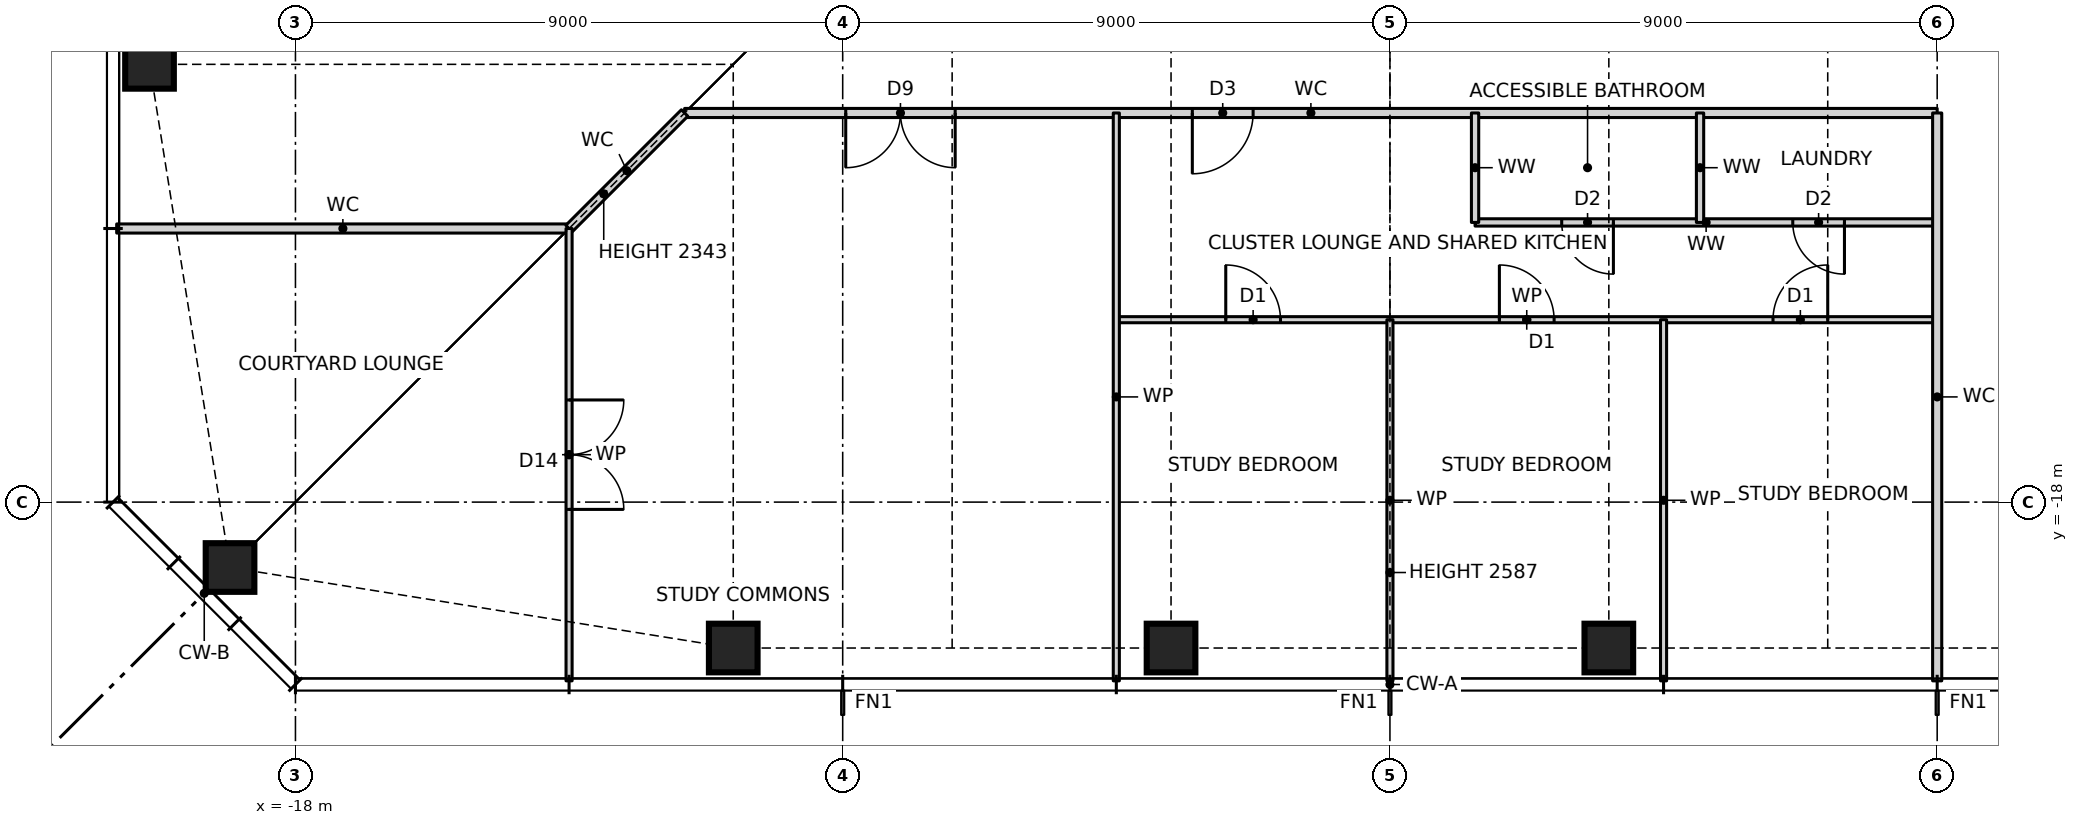
"""IFC4 building model, lengths in metres.
Left out: names, types, materials, properties, quantities, classifications, styles, units other than length and angle.
Written with IfcOpenShell. Run it as: python <this file> out.ifc"""

import sys

from ifc_helpers import new_model, si_unit, direction, frame, frame_2d, origin, origin_2d, place, context, subcontext, project, spatial, rectangle, hollow_rectangle, extrude, element, fill, save


model = new_model("IFC4")
c1 = context("Model", 3, precision=1e-05, world=origin(), true_north=direction((0.0, 1.0)))
c2 = subcontext(c1, "Body", "Model", "MODEL_VIEW")
j1 = project(units=[si_unit("LENGTHUNIT", "METRE"), si_unit("PLANEANGLEUNIT", "RADIAN")], contexts=[c1])
p1 = place(None, origin())
s1 = spatial("IfcSite", under=j1, at=p1, CompositionType="ELEMENT")
p2 = place(p1, origin())
s2 = spatial("IfcBuilding", under=s1, at=p2, CompositionType="ELEMENT")
p3 = place(p2, frame((0.0, 0.0, 108.5)))
s3 = spatial("IfcBuildingStorey", under=s2, at=p3, CompositionType="ELEMENT", Elevation=108.5)
for number, where, z_axis, x_axis in (
    (1, (-19.076, -19.076, 0.0), (0.0, 0.0, 1.0), (1.0, 0.0, 0.0)),
    (2, (-10.8, -20.4, 0.0), (0.0, 0.0, 1.0), (1.0, 0.0, 0.0)),
    (3, (-3.6, -20.4, 0.0), (0.0, 0.0, 1.0), (1.0, 0.0, 0.0)),
    (4, (3.6, -20.4, 0.0), (0.0, 0.0, 1.0), (1.0, 0.0, 0.0)),
    (5, (-20.4, -10.8, 0.0), (0.0, 0.0, 1.0), (1.0, 0.0, 0.0)),
):
    element("IfcColumn", number, at=place(p3, frame(where, z_axis=z_axis, x_axis=x_axis)), inside=s3, PredefinedType="COLUMN", context=c2, shape_type="SweptSolid", body=[
        extrude(hollow_rectangle(XDim=0.8, YDim=0.8, WallThickness=0.07, at=origin_2d()), origin(), (0.0, 0.0, 1.0), 3.5),
    ])
p4 = place(p3, frame((-4.5, -15.0, 0.0), z_axis=(0.0, 0.0, 1.0), x_axis=(1.0, 0.0, 0.0)))
e6 = element("IfcWall", 6, at=p4, inside=s3, PredefinedType="PARTITIONING", context=c2, shape_type="SweptSolid", body=[
    extrude(rectangle(XDim=13.5, YDim=0.1, at=frame_2d((6.75, 0.0))), origin(), (0.0, 0.0, 1.0), 3.27),
])
p5 = place(p4, frame((1.8, 0.0, 0.0)))
e7 = element("IfcOpeningElement", 7, at=p5, cuts=e6, PredefinedType="OPENING", context=c2, shape_type="SweptSolid", body=[
    extrude(rectangle(XDim=0.9, YDim=2.1, at=frame_2d((0.45, 1.05))), frame((0.0, 0.06, 0.0), z_axis=(0.0, -1.0, 0.0), x_axis=(1.0, 0.0, 0.0)), (0.0, 0.0, 1.0), 0.12),
])
p6 = place(p4, frame((6.3, 0.0, 0.0)))
e8 = element("IfcOpeningElement", 8, at=p6, cuts=e6, PredefinedType="OPENING", context=c2, shape_type="SweptSolid", body=[
    extrude(rectangle(XDim=0.9, YDim=2.1, at=frame_2d((0.45, 1.05))), frame((0.0, 0.06, 0.0), z_axis=(0.0, -1.0, 0.0), x_axis=(1.0, 0.0, 0.0)), (0.0, 0.0, 1.0), 0.12),
])
p7 = place(p4, frame((10.8, 0.0, 0.0)))
e9 = element("IfcOpeningElement", 9, at=p7, cuts=e6, PredefinedType="OPENING", context=c2, shape_type="SweptSolid", body=[
    extrude(rectangle(XDim=0.9, YDim=2.1, at=frame_2d((0.45, 1.05))), frame((0.0, 0.06, 0.0), z_axis=(0.0, -1.0, 0.0), x_axis=(1.0, 0.0, 0.0)), (0.0, 0.0, 1.0), 0.12),
])
p8 = place(p3, frame((-20.94, -13.5, 0.0), z_axis=(0.0, 0.0, 1.0), x_axis=(1.0, 0.0, 0.0)))
e10 = element("IfcWall", 10, at=p8, inside=s3, PredefinedType="PARTITIONING", context=c2, shape_type="SweptSolid", body=[
    extrude(rectangle(XDim=7.44, YDim=0.15, at=frame_2d((3.72, 0.0))), origin(), (0.0, 0.0, 1.0), 3.27),
])
p9 = place(p3, frame((1.4, -13.4, 0.0), z_axis=(0.0, 0.0, 1.0), x_axis=(1.0, 0.0, 0.0)))
e11 = element("IfcWall", 11, at=p9, inside=s3, PredefinedType="PARTITIONING", context=c2, shape_type="SweptSolid", body=[
    extrude(rectangle(XDim=7.6, YDim=0.12, at=frame_2d((3.8, 0.0))), origin(), (0.0, 0.0, 1.0), 3.27),
])
p10 = place(p9, frame((1.425, 0.0, 0.0)))
e12 = element("IfcOpeningElement", 12, at=p10, cuts=e11, PredefinedType="OPENING", context=c2, shape_type="SweptSolid", body=[
    extrude(rectangle(XDim=0.85, YDim=2.1, at=frame_2d((0.425, 1.05))), frame((0.0, 0.07, 0.0), z_axis=(0.0, -1.0, 0.0), x_axis=(1.0, 0.0, 0.0)), (0.0, 0.0, 1.0), 0.14),
])
p11 = place(p9, frame((5.225, 0.0, 0.0)))
e13 = element("IfcOpeningElement", 13, at=p11, cuts=e11, PredefinedType="OPENING", context=c2, shape_type="SweptSolid", body=[
    extrude(rectangle(XDim=0.85, YDim=2.1, at=frame_2d((0.425, 1.05))), frame((0.0, 0.07, 0.0), z_axis=(0.0, -1.0, 0.0), x_axis=(1.0, 0.0, 0.0)), (0.0, 0.0, 1.0), 0.14),
])
p12 = place(p3, frame((-11.6, -11.6, 0.0), z_axis=(0.0, 0.0, 1.0), x_axis=(1.0, 0.0, 0.0)))
e14 = element("IfcWall", 14, at=p12, inside=s3, PredefinedType="PARTITIONING", context=c2, shape_type="SweptSolid", body=[
    extrude(rectangle(XDim=20.6, YDim=0.15, at=frame_2d((10.3, 0.0))), origin(), (0.0, 0.0, 1.0), 3.27),
])
p13 = place(p12, frame((2.65, 0.0, 0.0)))
e15 = element("IfcOpeningElement", 15, at=p13, cuts=e14, PredefinedType="OPENING", context=c2, shape_type="SweptSolid", body=[
    extrude(rectangle(XDim=1.8, YDim=2.1, at=frame_2d((0.9, 1.05))), frame((0.0, 0.085, 0.0), z_axis=(0.0, -1.0, 0.0), x_axis=(1.0, 0.0, 0.0)), (0.0, 0.0, 1.0), 0.17),
])
p14 = place(p12, frame((8.35, 0.0, 0.0)))
e16 = element("IfcOpeningElement", 16, at=p14, cuts=e14, PredefinedType="OPENING", context=c2, shape_type="SweptSolid", body=[
    extrude(rectangle(XDim=1.0, YDim=2.1, at=frame_2d((0.5, 1.05))), frame((0.0, 0.085, 0.0), z_axis=(0.0, -1.0, 0.0), x_axis=(1.0, 0.0, 0.0)), (0.0, 0.0, 1.0), 0.17),
])
p15 = place(p3, frame((-13.5, -13.5, 0.0), z_axis=(0.0, 0.0, 1.0), x_axis=(0.707106781187, 0.707106781187, 0.0)))
e17 = element("IfcWall", 17, at=p15, inside=s3, PredefinedType="PARTITIONING", context=c2, shape_type="SweptSolid", body=[
    extrude(rectangle(XDim=2.687, YDim=0.15, at=frame_2d((1.343, 0.0))), origin(), (0.0, 0.0, 1.0), 2.343),
])
p16 = place(p3, frame((9.0, -20.94, 0.0), z_axis=(0.0, 0.0, 1.0), x_axis=(0.0, 1.0, 0.0)))
e18 = element("IfcWall", 18, at=p16, inside=s3, PredefinedType="PARTITIONING", context=c2, shape_type="SweptSolid", body=[
    extrude(rectangle(XDim=9.34, YDim=0.15, at=frame_2d((4.67, 0.0))), origin(), (0.0, 0.0, 1.0), 3.27),
])
p17 = place(p3, frame((5.1, -13.4, 0.0), z_axis=(0.0, 0.0, 1.0), x_axis=(0.0, 1.0, 0.0)))
e19 = element("IfcWall", 19, at=p17, inside=s3, PredefinedType="PARTITIONING", context=c2, shape_type="SweptSolid", body=[
    extrude(rectangle(XDim=1.8, YDim=0.12, at=frame_2d((0.9, 0.0))), origin(), (0.0, 0.0, 1.0), 3.27),
])
p18 = place(p3, frame((4.5, -20.94, 0.0), z_axis=(0.0, 0.0, 1.0), x_axis=(0.0, 1.0, 0.0)))
e20 = element("IfcWall", 20, at=p18, inside=s3, PredefinedType="PARTITIONING", context=c2, shape_type="SweptSolid", body=[
    extrude(rectangle(XDim=5.94, YDim=0.1, at=frame_2d((2.97, 0.0))), origin(), (0.0, 0.0, 1.0), 3.27),
])
p19 = place(p3, frame((1.4, -13.4, 0.0), z_axis=(0.0, 0.0, 1.0), x_axis=(0.0, 1.0, 0.0)))
e21 = element("IfcWall", 21, at=p19, inside=s3, PredefinedType="PARTITIONING", context=c2, shape_type="SweptSolid", body=[
    extrude(rectangle(XDim=1.8, YDim=0.12, at=frame_2d((0.9, 0.0))), origin(), (0.0, 0.0, 1.0), 3.27),
])
p20 = place(p3, frame((0.0, -20.94, 0.0), z_axis=(0.0, 0.0, 1.0), x_axis=(0.0, 1.0, 0.0)))
e22 = element("IfcWall", 22, at=p20, inside=s3, PredefinedType="PARTITIONING", context=c2, shape_type="SweptSolid", body=[
    extrude(rectangle(XDim=5.94, YDim=0.1, at=frame_2d((2.97, 0.0))), origin(), (0.0, 0.0, 1.0), 2.587),
])
p21 = place(p3, frame((-4.5, -20.94, 0.0), z_axis=(0.0, 0.0, 1.0), x_axis=(0.0, 1.0, 0.0)))
e23 = element("IfcWall", 23, at=p21, inside=s3, PredefinedType="PARTITIONING", context=c2, shape_type="SweptSolid", body=[
    extrude(rectangle(XDim=9.34, YDim=0.1, at=frame_2d((4.67, 0.0))), origin(), (0.0, 0.0, 1.0), 3.27),
])
p22 = place(p3, frame((-13.5, -20.94, 0.0), z_axis=(0.0, 0.0, 1.0), x_axis=(0.0, 1.0, 0.0)))
e24 = element("IfcWall", 24, at=p22, inside=s3, PredefinedType="PARTITIONING", context=c2, shape_type="SweptSolid", body=[
    extrude(rectangle(XDim=7.44, YDim=0.1, at=frame_2d((3.72, 0.0))), origin(), (0.0, 0.0, 1.0), 3.27),
])
p23 = place(p22, frame((2.82, 0.0, 0.0)))
e25 = element("IfcOpeningElement", 25, at=p23, cuts=e24, PredefinedType="OPENING", context=c2, shape_type="SweptSolid", body=[
    extrude(rectangle(XDim=1.8, YDim=2.1, at=frame_2d((0.9, 1.05))), frame((0.0, 0.06, 0.0), z_axis=(0.0, -1.0, 0.0), x_axis=(1.0, 0.0, 0.0)), (0.0, 0.0, 1.0), 0.12),
])
p24 = place(p13, frame((1.8, 0.0, 0.0), z_axis=(0.0, 0.0, 1.0), x_axis=(-1.0, 0.0, 0.0)))
e26 = element("IfcDoor", 26, at=p24, inside=s3, OperationType="DOUBLE_DOOR_SINGLE_SWING", PredefinedType="DOOR", context=c2, shape_type="SweptSolid", body=[
    extrude(rectangle(XDim=1.8, YDim=2.1, at=frame_2d((0.9, 1.05))), frame((0.0, 0.025, 0.0), z_axis=(0.0, -1.0, 0.0), x_axis=(1.0, 0.0, 0.0)), (0.0, 0.0, 1.0), 0.05),
])
fill(e15, e26)
p25 = place(p5, origin())
e27 = element("IfcDoor", 27, at=p25, inside=s3, OperationType="SINGLE_SWING_LEFT", PredefinedType="DOOR", context=c2, shape_type="SweptSolid", body=[
    extrude(rectangle(XDim=0.9, YDim=2.1, at=frame_2d((0.45, 1.05))), frame((0.0, 0.025, 0.0), z_axis=(0.0, -1.0, 0.0), x_axis=(1.0, 0.0, 0.0)), (0.0, 0.0, 1.0), 0.05),
])
fill(e7, e27)
p26 = place(p6, origin())
e28 = element("IfcDoor", 28, at=p26, inside=s3, OperationType="SINGLE_SWING_LEFT", PredefinedType="DOOR", context=c2, shape_type="SweptSolid", body=[
    extrude(rectangle(XDim=0.9, YDim=2.1, at=frame_2d((0.45, 1.05))), frame((0.0, 0.025, 0.0), z_axis=(0.0, -1.0, 0.0), x_axis=(1.0, 0.0, 0.0)), (0.0, 0.0, 1.0), 0.05),
])
fill(e8, e28)
p27 = place(p7, origin())
e29 = element("IfcDoor", 29, at=p27, inside=s3, OperationType="SINGLE_SWING_RIGHT", PredefinedType="DOOR", context=c2, shape_type="SweptSolid", body=[
    extrude(rectangle(XDim=0.9, YDim=2.1, at=frame_2d((0.45, 1.05))), frame((0.0, 0.025, 0.0), z_axis=(0.0, -1.0, 0.0), x_axis=(1.0, 0.0, 0.0)), (0.0, 0.0, 1.0), 0.05),
])
fill(e9, e29)
p28 = place(p14, frame((1.0, 0.0, 0.0), z_axis=(0.0, 0.0, 1.0), x_axis=(-1.0, 0.0, 0.0)))
e30 = element("IfcDoor", 30, at=p28, inside=s3, OperationType="SINGLE_SWING_RIGHT", PredefinedType="DOOR", context=c2, shape_type="SweptSolid", body=[
    extrude(rectangle(XDim=1.0, YDim=2.1, at=frame_2d((0.5, 1.05))), frame((0.0, 0.025, 0.0), z_axis=(0.0, -1.0, 0.0), x_axis=(1.0, 0.0, 0.0)), (0.0, 0.0, 1.0), 0.05),
])
fill(e16, e30)
p29 = place(p10, frame((0.85, 0.0, 0.0), z_axis=(0.0, 0.0, 1.0), x_axis=(-1.0, 0.0, 0.0)))
e31 = element("IfcDoor", 31, at=p29, inside=s3, OperationType="SINGLE_SWING_LEFT", PredefinedType="DOOR", context=c2, shape_type="SweptSolid", body=[
    extrude(rectangle(XDim=0.85, YDim=2.1, at=frame_2d((0.425, 1.05))), frame((0.0, 0.025, 0.0), z_axis=(0.0, -1.0, 0.0), x_axis=(1.0, 0.0, 0.0)), (0.0, 0.0, 1.0), 0.05),
])
fill(e12, e31)
p30 = place(p11, frame((0.85, 0.0, 0.0), z_axis=(0.0, 0.0, 1.0), x_axis=(-1.0, 0.0, 0.0)))
e32 = element("IfcDoor", 32, at=p30, inside=s3, OperationType="SINGLE_SWING_LEFT", PredefinedType="DOOR", context=c2, shape_type="SweptSolid", body=[
    extrude(rectangle(XDim=0.85, YDim=2.1, at=frame_2d((0.425, 1.05))), frame((0.0, 0.025, 0.0), z_axis=(0.0, -1.0, 0.0), x_axis=(1.0, 0.0, 0.0)), (0.0, 0.0, 1.0), 0.05),
])
fill(e13, e32)
p31 = place(p23, frame((1.8, 0.0, 0.0), z_axis=(0.0, 0.0, 1.0), x_axis=(-1.0, 0.0, 0.0)))
e33 = element("IfcDoor", 33, at=p31, inside=s3, OperationType="DOUBLE_DOOR_SINGLE_SWING", PredefinedType="DOOR", context=c2, shape_type="SweptSolid", body=[
    extrude(rectangle(XDim=1.8, YDim=2.1, at=frame_2d((0.9, 1.05))), frame((0.0, 0.025, 0.0), z_axis=(0.0, -1.0, 0.0), x_axis=(1.0, 0.0, 0.0)), (0.0, 0.0, 1.0), 0.05),
])
fill(e25, e33)
save(model, sys.argv[1])
